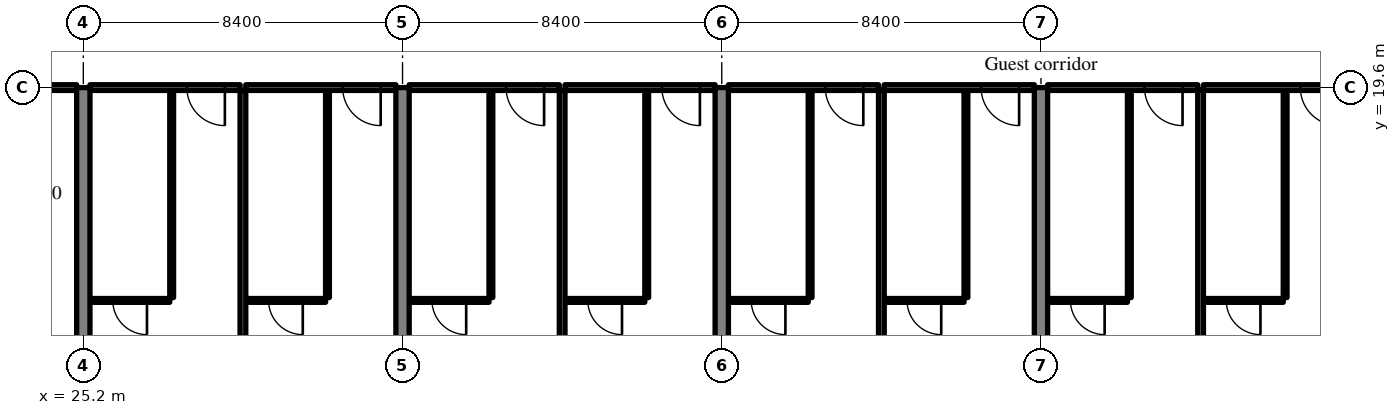
"""IFC4 building model, lengths in metres.
Left out: names, types, materials, properties, quantities, classifications, styles, units other than length and angle.
Written with IfcOpenShell. Run it as: python <this file> out.ifc"""

import sys

from ifc_helpers import new_model, si_unit, direction, frame, frame_2d, origin, place, context, subcontext, project, spatial, rectangle, extrude, source, transform, mapped, element, fill, save


model = new_model("IFC4")
c1 = context("Model", 3, precision=1e-05, world=origin(), true_north=direction((0.0, 1.0)))
c2 = subcontext(c1, "Body", "Model", "MODEL_VIEW")
j1 = project(units=[si_unit("LENGTHUNIT", "METRE"), si_unit("PLANEANGLEUNIT", "RADIAN")], contexts=[c1])
p1 = place(None, origin())
s1 = spatial("IfcSite", under=j1, at=p1, CompositionType="ELEMENT")
p2 = place(p1, origin())
s2 = spatial("IfcBuilding", under=s1, at=p2, CompositionType="ELEMENT")
p3 = place(p2, frame((0.0, 0.0, 99.0)))
s3 = spatial("IfcBuildingStorey", under=s2, at=p3, CompositionType="ELEMENT", Elevation=99.0)
m1 = source(origin(), c2, "Body", "SweptSolid", [
    extrude(rectangle(XDim=14.1, YDim=0.35, at=frame_2d((7.05, 0.0))), origin(), (0.0, 0.0, 1.0), 3.52),
])
for number, where, z_axis, x_axis in (
    (1, (25.2, 5.5, 0.0), (0.0, 0.0, 1.0), (0.0, 1.0, 0.0)),
    (2, (33.6, 5.5, 0.0), (0.0, 0.0, 1.0), (0.0, 1.0, 0.0)),
    (3, (42.0, 5.5, 0.0), (0.0, 0.0, 1.0), (0.0, 1.0, 0.0)),
):
    element("IfcWall", number, at=place(p3, frame(where, z_axis=z_axis, x_axis=x_axis)), inside=s3, PredefinedType="SHEAR", context=c2, shape_type="MappedRepresentation", body=[
        mapped(m1, transform((0.0, 0.0, 0.0), scale=1.0)),
    ])
m2 = source(origin(), c2, "Body", "SweptSolid", [
    extrude(rectangle(XDim=13.1, YDim=0.35, at=frame_2d((6.55, 0.0))), origin(), (0.0, 0.0, 1.0), 3.52),
])
p4 = place(p3, frame((50.4, 6.5, 0.0), z_axis=(0.0, 0.0, 1.0), x_axis=(0.0, 1.0, 0.0)))
e4 = element("IfcWall", 4, at=p4, inside=s3, PredefinedType="SHEAR", context=c2, shape_type="MappedRepresentation", body=[
    mapped(m2, transform((0.0, 0.0, 0.0), scale=1.0)),
])
m3 = source(origin(), c2, "Body", "SweptSolid", [
    extrude(rectangle(XDim=8.05, YDim=0.15, at=frame_2d((4.025, 0.0))), origin(), (0.0, 0.0, 1.0), 2.82),
])
p5 = place(p3, frame((16.975, 19.6, 0.0), z_axis=(0.0, 0.0, 1.0), x_axis=(1.0, 0.0, 0.0)))
e5 = element("IfcWall", 5, at=p5, inside=s3, PredefinedType="PARTITIONING", context=c2, shape_type="MappedRepresentation", body=[
    mapped(m3, transform((0.0, 0.0, 0.0), scale=1.0)),
])
m4 = source(origin(), c2, "Body", "SweptSolid", [
    extrude(rectangle(XDim=1.8, YDim=2.1, at=frame_2d((0.9, 1.05))), frame((0.0, 0.085, 0.0), z_axis=(0.0, -1.0, 0.0), x_axis=(1.0, 0.0, 0.0)), (0.0, 0.0, 1.0), 0.17),
])
p6 = place(p5, frame((3.125, 0.0, 0.0)))
e6 = element("IfcOpeningElement", 6, at=p6, cuts=e5, PredefinedType="OPENING", context=c2, shape_type="MappedRepresentation", body=[
    mapped(m4, transform((0.0, 0.0, 0.0), scale=1.0)),
])
m5 = source(origin(), c2, "Body", "SweptSolid", [
    extrude(rectangle(XDim=5.45, YDim=0.1, at=frame_2d((2.725, 0.0))), origin(), (0.0, 0.0, 1.0), 3.52),
])
p7 = place(p3, frame((27.525, 14.075, 0.0), z_axis=(0.0, 0.0, 1.0), x_axis=(0.0, 1.0, 0.0)))
e7 = element("IfcWall", 7, at=p7, inside=s3, PredefinedType="PARTITIONING", context=c2, shape_type="MappedRepresentation", body=[
    mapped(m5, transform((0.0, 0.0, 0.0), scale=1.0)),
])
m6 = source(origin(), c2, "Body", "SweptSolid", [
    extrude(rectangle(XDim=2.1, YDim=0.1, at=frame_2d((1.05, 0.0))), origin(), (0.0, 0.0, 1.0), 3.52),
])
p8 = place(p3, frame((25.375, 14.0, 0.0), z_axis=(0.0, 0.0, 1.0), x_axis=(1.0, 0.0, 0.0)))
e8 = element("IfcWall", 8, at=p8, inside=s3, PredefinedType="PARTITIONING", context=c2, shape_type="MappedRepresentation", body=[
    mapped(m6, transform((0.0, 0.0, 0.0), scale=1.0)),
])
m7 = source(origin(), c2, "Body", "SweptSolid", [
    extrude(rectangle(XDim=0.9, YDim=2.1, at=frame_2d((0.45, 1.05))), frame((0.0, 0.06, 0.0), z_axis=(0.0, -1.0, 0.0), x_axis=(1.0, 0.0, 0.0)), (0.0, 0.0, 1.0), 0.12),
])
p9 = place(p8, frame((0.6, 0.0, 0.0)))
e9 = element("IfcOpeningElement", 9, at=p9, cuts=e8, PredefinedType="OPENING", context=c2, shape_type="MappedRepresentation", body=[
    mapped(m7, transform((0.0, 0.0, 0.0), scale=1.0)),
])
m8 = source(origin(), c2, "Body", "SweptSolid", [
    extrude(rectangle(XDim=3.95, YDim=0.15, at=frame_2d((1.975, 0.0))), origin(), (0.0, 0.0, 1.0), 2.82),
])
p10 = place(p3, frame((25.375, 19.6, 0.0), z_axis=(0.0, 0.0, 1.0), x_axis=(1.0, 0.0, 0.0)))
e10 = element("IfcWall", 10, at=p10, inside=s3, PredefinedType="PARTITIONING", context=c2, shape_type="MappedRepresentation", body=[
    mapped(m8, transform((0.0, 0.0, 0.0), scale=1.0)),
])
m9 = source(origin(), c2, "Body", "SweptSolid", [
    extrude(rectangle(XDim=1.0, YDim=2.1, at=frame_2d((0.5, 1.05))), frame((0.0, 0.085, 0.0), z_axis=(0.0, -1.0, 0.0), x_axis=(1.0, 0.0, 0.0)), (0.0, 0.0, 1.0), 0.17),
])
p11 = place(p10, frame((2.55, 0.0, 0.0)))
e11 = element("IfcOpeningElement", 11, at=p11, cuts=e10, PredefinedType="OPENING", context=c2, shape_type="MappedRepresentation", body=[
    mapped(m9, transform((0.0, 0.0, 0.0), scale=1.0)),
])
p12 = place(p3, frame((31.625, 14.075, 0.0), z_axis=(0.0, 0.0, 1.0), x_axis=(0.0, 1.0, 0.0)))
e12 = element("IfcWall", 12, at=p12, inside=s3, PredefinedType="PARTITIONING", context=c2, shape_type="MappedRepresentation", body=[
    mapped(m5, transform((0.0, 0.0, 0.0), scale=1.0)),
])
m10 = source(origin(), c2, "Body", "SweptSolid", [
    extrude(rectangle(XDim=2.1, YDim=0.1, at=frame_2d((1.05, 0.0))), origin(), (0.0, 0.0, 1.0), 3.52),
])
p13 = place(p3, frame((29.475, 14.0, 0.0), z_axis=(0.0, 0.0, 1.0), x_axis=(1.0, 0.0, 0.0)))
e13 = element("IfcWall", 13, at=p13, inside=s3, PredefinedType="PARTITIONING", context=c2, shape_type="MappedRepresentation", body=[
    mapped(m10, transform((0.0, 0.0, 0.0), scale=1.0)),
])
p14 = place(p13, frame((0.6, 0.0, 0.0)))
e14 = element("IfcOpeningElement", 14, at=p14, cuts=e13, PredefinedType="OPENING", context=c2, shape_type="MappedRepresentation", body=[
    mapped(m7, transform((0.0, 0.0, 0.0), scale=1.0)),
])
p15 = place(p3, frame((29.475, 19.6, 0.0), z_axis=(0.0, 0.0, 1.0), x_axis=(1.0, 0.0, 0.0)))
e15 = element("IfcWall", 15, at=p15, inside=s3, PredefinedType="PARTITIONING", context=c2, shape_type="MappedRepresentation", body=[
    mapped(m8, transform((0.0, 0.0, 0.0), scale=1.0)),
])
p16 = place(p15, frame((2.55, 0.0, 0.0)))
e16 = element("IfcOpeningElement", 16, at=p16, cuts=e15, PredefinedType="OPENING", context=c2, shape_type="MappedRepresentation", body=[
    mapped(m9, transform((0.0, 0.0, 0.0), scale=1.0)),
])
m11 = source(origin(), c2, "Body", "SweptSolid", [
    extrude(rectangle(XDim=12.275, YDim=0.15, at=frame_2d((6.137, 0.0))), origin(), (0.0, 0.0, 1.0), 3.52),
])
p17 = place(p3, frame((29.4, 7.25, 0.0), z_axis=(0.0, 0.0, 1.0), x_axis=(0.0, 1.0, 0.0)))
e17 = element("IfcWall", 17, at=p17, inside=s3, PredefinedType="PARTITIONING", context=c2, shape_type="MappedRepresentation", body=[
    mapped(m11, transform((0.0, 0.0, 0.0), scale=1.0)),
])
p18 = place(p3, frame((35.925, 14.075, 0.0), z_axis=(0.0, 0.0, 1.0), x_axis=(0.0, 1.0, 0.0)))
e18 = element("IfcWall", 18, at=p18, inside=s3, PredefinedType="PARTITIONING", context=c2, shape_type="MappedRepresentation", body=[
    mapped(m5, transform((0.0, 0.0, 0.0), scale=1.0)),
])
p19 = place(p3, frame((33.775, 14.0, 0.0), z_axis=(0.0, 0.0, 1.0), x_axis=(1.0, 0.0, 0.0)))
e19 = element("IfcWall", 19, at=p19, inside=s3, PredefinedType="PARTITIONING", context=c2, shape_type="MappedRepresentation", body=[
    mapped(m6, transform((0.0, 0.0, 0.0), scale=1.0)),
])
p20 = place(p19, frame((0.6, 0.0, 0.0)))
e20 = element("IfcOpeningElement", 20, at=p20, cuts=e19, PredefinedType="OPENING", context=c2, shape_type="MappedRepresentation", body=[
    mapped(m7, transform((0.0, 0.0, 0.0), scale=1.0)),
])
m12 = source(origin(), c2, "Body", "SweptSolid", [
    extrude(rectangle(XDim=3.95, YDim=0.15, at=frame_2d((1.975, 0.0))), origin(), (0.0, 0.0, 1.0), 2.82),
])
p21 = place(p3, frame((33.775, 19.6, 0.0), z_axis=(0.0, 0.0, 1.0), x_axis=(1.0, 0.0, 0.0)))
e21 = element("IfcWall", 21, at=p21, inside=s3, PredefinedType="PARTITIONING", context=c2, shape_type="MappedRepresentation", body=[
    mapped(m12, transform((0.0, 0.0, 0.0), scale=1.0)),
])
p22 = place(p21, frame((2.55, 0.0, 0.0)))
e22 = element("IfcOpeningElement", 22, at=p22, cuts=e21, PredefinedType="OPENING", context=c2, shape_type="MappedRepresentation", body=[
    mapped(m9, transform((0.0, 0.0, 0.0), scale=1.0)),
])
p23 = place(p3, frame((40.025, 14.075, 0.0), z_axis=(0.0, 0.0, 1.0), x_axis=(0.0, 1.0, 0.0)))
e23 = element("IfcWall", 23, at=p23, inside=s3, PredefinedType="PARTITIONING", context=c2, shape_type="MappedRepresentation", body=[
    mapped(m5, transform((0.0, 0.0, 0.0), scale=1.0)),
])
p24 = place(p3, frame((37.875, 14.0, 0.0), z_axis=(0.0, 0.0, 1.0), x_axis=(1.0, 0.0, 0.0)))
e24 = element("IfcWall", 24, at=p24, inside=s3, PredefinedType="PARTITIONING", context=c2, shape_type="MappedRepresentation", body=[
    mapped(m6, transform((0.0, 0.0, 0.0), scale=1.0)),
])
p25 = place(p24, frame((0.6, 0.0, 0.0)))
e25 = element("IfcOpeningElement", 25, at=p25, cuts=e24, PredefinedType="OPENING", context=c2, shape_type="MappedRepresentation", body=[
    mapped(m7, transform((0.0, 0.0, 0.0), scale=1.0)),
])
p26 = place(p3, frame((37.875, 19.6, 0.0), z_axis=(0.0, 0.0, 1.0), x_axis=(1.0, 0.0, 0.0)))
e26 = element("IfcWall", 26, at=p26, inside=s3, PredefinedType="PARTITIONING", context=c2, shape_type="MappedRepresentation", body=[
    mapped(m8, transform((0.0, 0.0, 0.0), scale=1.0)),
])
p27 = place(p26, frame((2.55, 0.0, 0.0)))
e27 = element("IfcOpeningElement", 27, at=p27, cuts=e26, PredefinedType="OPENING", context=c2, shape_type="MappedRepresentation", body=[
    mapped(m9, transform((0.0, 0.0, 0.0), scale=1.0)),
])
m13 = source(origin(), c2, "Body", "SweptSolid", [
    extrude(rectangle(XDim=15.498, YDim=0.15, at=frame_2d((7.749, 0.0))), origin(), (0.0, 0.0, 1.0), 3.52),
])
p28 = place(p3, frame((37.8, 4.027, 0.0), z_axis=(0.0, 0.0, 1.0), x_axis=(0.0, 1.0, 0.0)))
e28 = element("IfcWall", 28, at=p28, inside=s3, PredefinedType="PARTITIONING", context=c2, shape_type="MappedRepresentation", body=[
    mapped(m13, transform((0.0, 0.0, 0.0), scale=1.0)),
])
p29 = place(p3, frame((44.325, 14.075, 0.0), z_axis=(0.0, 0.0, 1.0), x_axis=(0.0, 1.0, 0.0)))
e29 = element("IfcWall", 29, at=p29, inside=s3, PredefinedType="PARTITIONING", context=c2, shape_type="MappedRepresentation", body=[
    mapped(m5, transform((0.0, 0.0, 0.0), scale=1.0)),
])
p30 = place(p3, frame((42.175, 14.0, 0.0), z_axis=(0.0, 0.0, 1.0), x_axis=(1.0, 0.0, 0.0)))
e30 = element("IfcWall", 30, at=p30, inside=s3, PredefinedType="PARTITIONING", context=c2, shape_type="MappedRepresentation", body=[
    mapped(m10, transform((0.0, 0.0, 0.0), scale=1.0)),
])
p31 = place(p30, frame((0.6, 0.0, 0.0)))
e31 = element("IfcOpeningElement", 31, at=p31, cuts=e30, PredefinedType="OPENING", context=c2, shape_type="MappedRepresentation", body=[
    mapped(m7, transform((0.0, 0.0, 0.0), scale=1.0)),
])
p32 = place(p3, frame((42.175, 19.6, 0.0), z_axis=(0.0, 0.0, 1.0), x_axis=(1.0, 0.0, 0.0)))
e32 = element("IfcWall", 32, at=p32, inside=s3, PredefinedType="PARTITIONING", context=c2, shape_type="MappedRepresentation", body=[
    mapped(m8, transform((0.0, 0.0, 0.0), scale=1.0)),
])
p33 = place(p32, frame((2.55, 0.0, 0.0)))
e33 = element("IfcOpeningElement", 33, at=p33, cuts=e32, PredefinedType="OPENING", context=c2, shape_type="MappedRepresentation", body=[
    mapped(m9, transform((0.0, 0.0, 0.0), scale=1.0)),
])
p34 = place(p3, frame((48.425, 14.075, 0.0), z_axis=(0.0, 0.0, 1.0), x_axis=(0.0, 1.0, 0.0)))
e34 = element("IfcWall", 34, at=p34, inside=s3, PredefinedType="PARTITIONING", context=c2, shape_type="MappedRepresentation", body=[
    mapped(m5, transform((0.0, 0.0, 0.0), scale=1.0)),
])
p35 = place(p3, frame((46.275, 14.0, 0.0), z_axis=(0.0, 0.0, 1.0), x_axis=(1.0, 0.0, 0.0)))
e35 = element("IfcWall", 35, at=p35, inside=s3, PredefinedType="PARTITIONING", context=c2, shape_type="MappedRepresentation", body=[
    mapped(m6, transform((0.0, 0.0, 0.0), scale=1.0)),
])
p36 = place(p35, frame((0.6, 0.0, 0.0)))
e36 = element("IfcOpeningElement", 36, at=p36, cuts=e35, PredefinedType="OPENING", context=c2, shape_type="MappedRepresentation", body=[
    mapped(m7, transform((0.0, 0.0, 0.0), scale=1.0)),
])
p37 = place(p3, frame((46.275, 19.6, 0.0), z_axis=(0.0, 0.0, 1.0), x_axis=(1.0, 0.0, 0.0)))
e37 = element("IfcWall", 37, at=p37, inside=s3, PredefinedType="PARTITIONING", context=c2, shape_type="MappedRepresentation", body=[
    mapped(m12, transform((0.0, 0.0, 0.0), scale=1.0)),
])
p38 = place(p37, frame((2.55, 0.0, 0.0)))
e38 = element("IfcOpeningElement", 38, at=p38, cuts=e37, PredefinedType="OPENING", context=c2, shape_type="MappedRepresentation", body=[
    mapped(m9, transform((0.0, 0.0, 0.0), scale=1.0)),
])
m14 = source(origin(), c2, "Body", "SweptSolid", [
    extrude(rectangle(XDim=14.906, YDim=0.15, at=frame_2d((7.453, 0.0))), origin(), (0.0, 0.0, 1.0), 3.52),
])
p39 = place(p3, frame((46.2, 4.619, 0.0), z_axis=(0.0, 0.0, 1.0), x_axis=(0.0, 1.0, 0.0)))
e39 = element("IfcWall", 39, at=p39, inside=s3, PredefinedType="PARTITIONING", context=c2, shape_type="MappedRepresentation", body=[
    mapped(m14, transform((0.0, 0.0, 0.0), scale=1.0)),
])
p40 = place(p3, frame((52.725, 14.075, 0.0), z_axis=(0.0, 0.0, 1.0), x_axis=(0.0, 1.0, 0.0)))
e40 = element("IfcWall", 40, at=p40, inside=s3, PredefinedType="PARTITIONING", context=c2, shape_type="MappedRepresentation", body=[
    mapped(m5, transform((0.0, 0.0, 0.0), scale=1.0)),
])
p41 = place(p3, frame((50.575, 14.0, 0.0), z_axis=(0.0, 0.0, 1.0), x_axis=(1.0, 0.0, 0.0)))
e41 = element("IfcWall", 41, at=p41, inside=s3, PredefinedType="PARTITIONING", context=c2, shape_type="MappedRepresentation", body=[
    mapped(m6, transform((0.0, 0.0, 0.0), scale=1.0)),
])
p42 = place(p41, frame((0.6, 0.0, 0.0)))
e42 = element("IfcOpeningElement", 42, at=p42, cuts=e41, PredefinedType="OPENING", context=c2, shape_type="MappedRepresentation", body=[
    mapped(m7, transform((0.0, 0.0, 0.0), scale=1.0)),
])
p43 = place(p3, frame((50.575, 19.6, 0.0), z_axis=(0.0, 0.0, 1.0), x_axis=(1.0, 0.0, 0.0)))
e43 = element("IfcWall", 43, at=p43, inside=s3, PredefinedType="PARTITIONING", context=c2, shape_type="MappedRepresentation", body=[
    mapped(m8, transform((0.0, 0.0, 0.0), scale=1.0)),
])
p44 = place(p43, frame((2.55, 0.0, 0.0)))
e44 = element("IfcOpeningElement", 44, at=p44, cuts=e43, PredefinedType="OPENING", context=c2, shape_type="MappedRepresentation", body=[
    mapped(m9, transform((0.0, 0.0, 0.0), scale=1.0)),
])
p45 = place(p3, frame((56.825, 14.075, 0.0), z_axis=(0.0, 0.0, 1.0), x_axis=(0.0, 1.0, 0.0)))
e45 = element("IfcWall", 45, at=p45, inside=s3, PredefinedType="PARTITIONING", context=c2, shape_type="MappedRepresentation", body=[
    mapped(m5, transform((0.0, 0.0, 0.0), scale=1.0)),
])
p46 = place(p3, frame((54.675, 14.0, 0.0), z_axis=(0.0, 0.0, 1.0), x_axis=(1.0, 0.0, 0.0)))
e46 = element("IfcWall", 46, at=p46, inside=s3, PredefinedType="PARTITIONING", context=c2, shape_type="MappedRepresentation", body=[
    mapped(m10, transform((0.0, 0.0, 0.0), scale=1.0)),
])
p47 = place(p46, frame((0.6, 0.0, 0.0)))
e47 = element("IfcOpeningElement", 47, at=p47, cuts=e46, PredefinedType="OPENING", context=c2, shape_type="MappedRepresentation", body=[
    mapped(m7, transform((0.0, 0.0, 0.0), scale=1.0)),
])
p48 = place(p3, frame((54.675, 19.6, 0.0), z_axis=(0.0, 0.0, 1.0), x_axis=(1.0, 0.0, 0.0)))
e48 = element("IfcWall", 48, at=p48, inside=s3, PredefinedType="PARTITIONING", context=c2, shape_type="MappedRepresentation", body=[
    mapped(m8, transform((0.0, 0.0, 0.0), scale=1.0)),
])
p49 = place(p48, frame((2.55, 0.0, 0.0)))
e49 = element("IfcOpeningElement", 49, at=p49, cuts=e48, PredefinedType="OPENING", context=c2, shape_type="MappedRepresentation", body=[
    mapped(m9, transform((0.0, 0.0, 0.0), scale=1.0)),
])
p50 = place(p3, frame((54.6, 4.619, 0.0), z_axis=(0.0, 0.0, 1.0), x_axis=(0.0, 1.0, 0.0)))
e50 = element("IfcWall", 50, at=p50, inside=s3, PredefinedType="PARTITIONING", context=c2, shape_type="MappedRepresentation", body=[
    mapped(m14, transform((0.0, 0.0, 0.0), scale=1.0)),
])
m15 = source(origin(), c2, "Body", "SweptSolid", [
    extrude(rectangle(XDim=0.9, YDim=2.1, at=frame_2d((0.45, 1.05))), frame((0.0, 0.025, 0.0), z_axis=(0.0, -1.0, 0.0), x_axis=(1.0, 0.0, 0.0)), (0.0, 0.0, 1.0), 0.05),
])
p51 = place(p9, origin())
e51 = element("IfcDoor", 51, at=p51, inside=s3, OperationType="SINGLE_SWING_RIGHT", PredefinedType="DOOR", context=c2, shape_type="MappedRepresentation", body=[
    mapped(m15, transform((0.0, 0.0, 0.0), scale=1.0)),
])
fill(e9, e51)
m16 = source(origin(), c2, "Body", "SweptSolid", [
    extrude(rectangle(XDim=1.0, YDim=2.1, at=frame_2d((0.5, 1.05))), frame((0.0, 0.025, 0.0), z_axis=(0.0, -1.0, 0.0), x_axis=(1.0, 0.0, 0.0)), (0.0, 0.0, 1.0), 0.05),
])
p52 = place(p11, origin())
e52 = element("IfcDoor", 52, at=p52, inside=s3, OperationType="SINGLE_SWING_RIGHT", PredefinedType="DOOR", context=c2, shape_type="MappedRepresentation", body=[
    mapped(m16, transform((0.0, 0.0, 0.0), scale=1.0)),
])
fill(e11, e52)
p53 = place(p14, origin())
e53 = element("IfcDoor", 53, at=p53, inside=s3, OperationType="SINGLE_SWING_RIGHT", PredefinedType="DOOR", context=c2, shape_type="MappedRepresentation", body=[
    mapped(m15, transform((0.0, 0.0, 0.0), scale=1.0)),
])
fill(e14, e53)
p54 = place(p16, origin())
e54 = element("IfcDoor", 54, at=p54, inside=s3, OperationType="SINGLE_SWING_RIGHT", PredefinedType="DOOR", context=c2, shape_type="MappedRepresentation", body=[
    mapped(m16, transform((0.0, 0.0, 0.0), scale=1.0)),
])
fill(e16, e54)
p55 = place(p20, origin())
e55 = element("IfcDoor", 55, at=p55, inside=s3, OperationType="SINGLE_SWING_RIGHT", PredefinedType="DOOR", context=c2, shape_type="MappedRepresentation", body=[
    mapped(m15, transform((0.0, 0.0, 0.0), scale=1.0)),
])
fill(e20, e55)
p56 = place(p22, origin())
e56 = element("IfcDoor", 56, at=p56, inside=s3, OperationType="SINGLE_SWING_RIGHT", PredefinedType="DOOR", context=c2, shape_type="MappedRepresentation", body=[
    mapped(m16, transform((0.0, 0.0, 0.0), scale=1.0)),
])
fill(e22, e56)
p57 = place(p25, origin())
e57 = element("IfcDoor", 57, at=p57, inside=s3, OperationType="SINGLE_SWING_RIGHT", PredefinedType="DOOR", context=c2, shape_type="MappedRepresentation", body=[
    mapped(m15, transform((0.0, 0.0, 0.0), scale=1.0)),
])
fill(e25, e57)
p58 = place(p27, origin())
e58 = element("IfcDoor", 58, at=p58, inside=s3, OperationType="SINGLE_SWING_RIGHT", PredefinedType="DOOR", context=c2, shape_type="MappedRepresentation", body=[
    mapped(m16, transform((0.0, 0.0, 0.0), scale=1.0)),
])
fill(e27, e58)
p59 = place(p31, origin())
e59 = element("IfcDoor", 59, at=p59, inside=s3, OperationType="SINGLE_SWING_RIGHT", PredefinedType="DOOR", context=c2, shape_type="MappedRepresentation", body=[
    mapped(m15, transform((0.0, 0.0, 0.0), scale=1.0)),
])
fill(e31, e59)
p60 = place(p33, origin())
e60 = element("IfcDoor", 60, at=p60, inside=s3, OperationType="SINGLE_SWING_RIGHT", PredefinedType="DOOR", context=c2, shape_type="MappedRepresentation", body=[
    mapped(m16, transform((0.0, 0.0, 0.0), scale=1.0)),
])
fill(e33, e60)
p61 = place(p36, origin())
e61 = element("IfcDoor", 61, at=p61, inside=s3, OperationType="SINGLE_SWING_RIGHT", PredefinedType="DOOR", context=c2, shape_type="MappedRepresentation", body=[
    mapped(m15, transform((0.0, 0.0, 0.0), scale=1.0)),
])
fill(e36, e61)
p62 = place(p38, origin())
e62 = element("IfcDoor", 62, at=p62, inside=s3, OperationType="SINGLE_SWING_RIGHT", PredefinedType="DOOR", context=c2, shape_type="MappedRepresentation", body=[
    mapped(m16, transform((0.0, 0.0, 0.0), scale=1.0)),
])
fill(e38, e62)
p63 = place(p42, origin())
e63 = element("IfcDoor", 63, at=p63, inside=s3, OperationType="SINGLE_SWING_RIGHT", PredefinedType="DOOR", context=c2, shape_type="MappedRepresentation", body=[
    mapped(m15, transform((0.0, 0.0, 0.0), scale=1.0)),
])
fill(e42, e63)
p64 = place(p44, origin())
e64 = element("IfcDoor", 64, at=p64, inside=s3, OperationType="SINGLE_SWING_RIGHT", PredefinedType="DOOR", context=c2, shape_type="MappedRepresentation", body=[
    mapped(m16, transform((0.0, 0.0, 0.0), scale=1.0)),
])
fill(e44, e64)
p65 = place(p47, origin())
e65 = element("IfcDoor", 65, at=p65, inside=s3, OperationType="SINGLE_SWING_RIGHT", PredefinedType="DOOR", context=c2, shape_type="MappedRepresentation", body=[
    mapped(m15, transform((0.0, 0.0, 0.0), scale=1.0)),
])
fill(e47, e65)
p66 = place(p49, origin())
e66 = element("IfcDoor", 66, at=p66, inside=s3, OperationType="SINGLE_SWING_RIGHT", PredefinedType="DOOR", context=c2, shape_type="MappedRepresentation", body=[
    mapped(m16, transform((0.0, 0.0, 0.0), scale=1.0)),
])
fill(e49, e66)
save(model, sys.argv[1])
